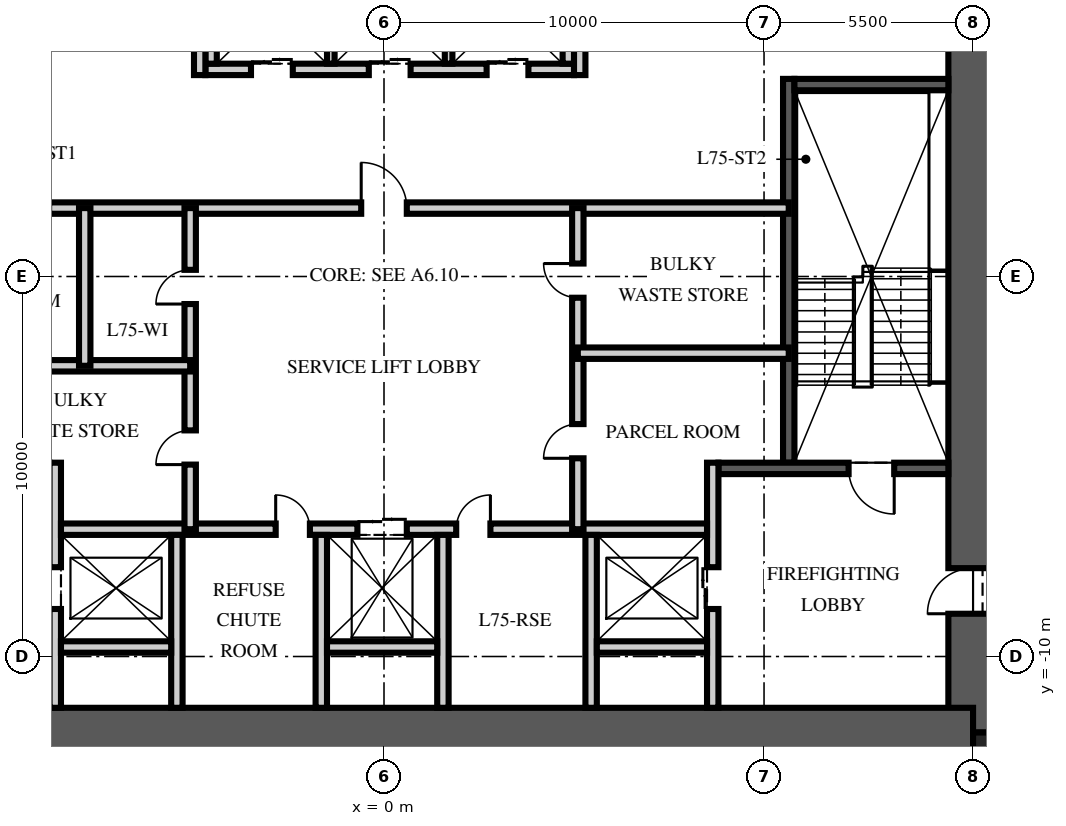
"""IFC4 building model, lengths in metres.
Left out: names, types, materials, properties, quantities, classifications, styles, units other than length and angle.
Written with IfcOpenShell. Run it as: python <this file> out.ifc"""

import sys

from ifc_helpers import new_model, si_unit, direction, frame, frame_2d, origin, origin_2d, place, context, subcontext, project, spatial, rectangle, extrude, element, fill, save


model = new_model("IFC4")
c1 = context("Model", 3, precision=1e-05, world=origin(), true_north=direction((0.0, 1.0)))
c2 = subcontext(c1, "Body", "Model", "MODEL_VIEW")
j1 = project(units=[si_unit("LENGTHUNIT", "METRE"), si_unit("PLANEANGLEUNIT", "RADIAN")], contexts=[c1])
p1 = place(None, origin())
s1 = spatial("IfcSite", under=j1, at=p1, CompositionType="ELEMENT")
p2 = place(p1, origin())
s2 = spatial("IfcBuilding", under=s1, at=p2, CompositionType="ELEMENT")
p3 = place(p2, frame((0.0, 0.0, 300.75)))
s3 = spatial("IfcBuildingStorey", under=s2, at=p3, CompositionType="ELEMENT", Elevation=300.75)
p4 = place(p3, frame((15.5, -12.0, -0.25), z_axis=(0.0, 0.0, 1.0), x_axis=(0.0, 1.0, 0.0)))
e1 = element("IfcWall", 1, at=p4, inside=s3, PredefinedType="SHEAR", context=c2, shape_type="SweptSolid", body=[
    extrude(rectangle(XDim=24.0, YDim=1.3, at=frame_2d((12.0, 0.0))), origin(), (0.0, 0.0, 1.0), 3.75),
])
p5 = place(p4, frame((3.125, 0.0, 0.25)))
e2 = element("IfcOpeningElement", 2, at=p5, cuts=e1, PredefinedType="OPENING", context=c2, shape_type="SweptSolid", body=[
    extrude(rectangle(XDim=1.2, YDim=2.1, at=frame_2d((0.6, 1.05))), frame((0.0, 0.66, 0.0), z_axis=(0.0, -1.0, 0.0), x_axis=(1.0, 0.0, 0.0)), (0.0, 0.0, 1.0), 1.32),
])
p6 = place(p4, frame((19.375, 0.0, 0.25)))
e3 = element("IfcOpeningElement", 3, at=p6, cuts=e1, PredefinedType="OPENING", context=c2, shape_type="SweptSolid", body=[
    extrude(rectangle(XDim=1.8, YDim=2.1, at=frame_2d((0.9, 1.05))), frame((0.0, 0.66, 0.0), z_axis=(0.0, -1.0, 0.0), x_axis=(1.0, 0.0, 0.0)), (0.0, 0.0, 1.0), 1.32),
])
p7 = place(p3, frame((-15.5, -12.0, -0.25), z_axis=(0.0, 0.0, 1.0), x_axis=(1.0, 0.0, 0.0)))
e4 = element("IfcWall", 4, at=p7, inside=s3, PredefinedType="SHEAR", context=c2, shape_type="SweptSolid", body=[
    extrude(rectangle(XDim=31.0, YDim=1.3, at=frame_2d((15.5, 0.0))), origin(), (0.0, 0.0, 1.0), 3.75),
])
p8 = place(p3, frame((15.825, -12.325, -0.25), z_axis=(0.0, 0.0, 1.0), x_axis=(1.0, 0.0, 0.0)))
e5 = element("IfcColumn", 5, at=p8, inside=s3, PredefinedType="COLUMN", context=c2, shape_type="SweptSolid", body=[
    extrude(rectangle(XDim=0.65, YDim=0.65, at=origin_2d()), origin(), (0.0, 0.0, 1.0), 3.75),
])
p9 = place(p3, frame((-8.65, -11.35, 0.0), z_axis=(0.0, 0.0, 1.0), x_axis=(0.0, 1.0, 0.0)))
e6 = element("IfcWall", 6, at=p9, inside=s3, PredefinedType="PARTITIONING", context=c2, shape_type="SweptSolid", body=[
    extrude(rectangle(XDim=6.45, YDim=0.3, at=frame_2d((3.225, 0.0))), origin(), (0.0, 0.0, 1.0), 3.5),
])
p10 = place(p9, frame((2.6, 0.0, 0.0)))
e7 = element("IfcOpeningElement", 7, at=p10, cuts=e6, PredefinedType="OPENING", context=c2, shape_type="SweptSolid", body=[
    extrude(rectangle(XDim=1.1, YDim=2.1, at=frame_2d((0.55, 1.05))), frame((0.0, 0.16, 0.0), z_axis=(0.0, -1.0, 0.0), x_axis=(1.0, 0.0, 0.0)), (0.0, 0.0, 1.0), 0.32),
])
p11 = place(p3, frame((10.65, -4.9, 0.0), z_axis=(0.0, 0.0, 1.0), x_axis=(0.0, 1.0, 0.0)))
e8 = element("IfcWall", 8, at=p11, inside=s3, PredefinedType="SOLIDWALL", context=c2, shape_type="SweptSolid", body=[
    extrude(rectangle(XDim=10.1, YDim=0.3, at=frame_2d((5.05, 0.0))), origin(), (0.0, 0.0, 1.0), 3.5),
])
p12 = place(p3, frame((14.85, -5.05, 0.0), z_axis=(0.0, 0.0, 1.0), x_axis=(-1.0, 0.0, 0.0)))
e9 = element("IfcWall", 9, at=p12, inside=s3, PredefinedType="SOLIDWALL", context=c2, shape_type="SweptSolid", body=[
    extrude(rectangle(XDim=6.05, YDim=0.3, at=frame_2d((3.025, 0.0))), origin(), (0.0, 0.0, 1.0), 3.5),
])
p13 = place(p12, frame((1.425, 0.0, 0.0)))
e10 = element("IfcOpeningElement", 10, at=p13, cuts=e9, PredefinedType="OPENING", context=c2, shape_type="SweptSolid", body=[
    extrude(rectangle(XDim=1.2, YDim=2.1, at=frame_2d((0.6, 1.05))), frame((0.0, 0.16, 0.0), z_axis=(0.0, -1.0, 0.0), x_axis=(1.0, 0.0, 0.0)), (0.0, 0.0, 1.0), 0.32),
])
p14 = place(p3, frame((14.85, 5.05, 0.0), z_axis=(0.0, 0.0, 1.0), x_axis=(-1.0, 0.0, 0.0)))
e11 = element("IfcWall", 11, at=p14, inside=s3, PredefinedType="SOLIDWALL", context=c2, shape_type="SweptSolid", body=[
    extrude(rectangle(XDim=4.05, YDim=0.3, at=frame_2d((2.025, 0.0))), origin(), (0.0, 0.0, 1.0), 3.5),
])
p15 = place(p3, frame((8.65, -11.35, 0.0), z_axis=(0.0, 0.0, 1.0), x_axis=(0.0, 1.0, 0.0)))
e12 = element("IfcWall", 12, at=p15, inside=s3, PredefinedType="PARTITIONING", context=c2, shape_type="SweptSolid", body=[
    extrude(rectangle(XDim=6.45, YDim=0.3, at=frame_2d((3.225, 0.0))), origin(), (0.0, 0.0, 1.0), 3.5),
])
p16 = place(p15, frame((2.6, 0.0, 0.0)))
e13 = element("IfcOpeningElement", 13, at=p16, cuts=e12, PredefinedType="OPENING", context=c2, shape_type="SweptSolid", body=[
    extrude(rectangle(XDim=1.1, YDim=2.1, at=frame_2d((0.55, 1.05))), frame((0.0, 0.16, 0.0), z_axis=(0.0, -1.0, 0.0), x_axis=(1.0, 0.0, 0.0)), (0.0, 0.0, 1.0), 0.32),
])
p17 = place(p3, frame((-8.5, -6.65, 0.0), z_axis=(0.0, 0.0, 1.0), x_axis=(1.0, 0.0, 0.0)))
e14 = element("IfcWall", 14, at=p17, inside=s3, PredefinedType="PARTITIONING", context=c2, shape_type="SweptSolid", body=[
    extrude(rectangle(XDim=17.0, YDim=0.3, at=frame_2d((8.5, 0.0))), origin(), (0.0, 0.0, 1.0), 3.5),
])
p18 = place(p17, frame((7.8, 0.0, 0.0)))
e15 = element("IfcOpeningElement", 15, at=p18, cuts=e14, PredefinedType="OPENING", context=c2, shape_type="SweptSolid", body=[
    extrude(rectangle(XDim=1.3, YDim=2.4, at=frame_2d((0.65, 1.2))), frame((0.0, 0.16, 0.0), z_axis=(0.0, -1.0, 0.0), x_axis=(1.0, 0.0, 0.0)), (0.0, 0.0, 1.0), 0.32),
])
p19 = place(p17, frame((5.65, 0.0, 0.0)))
e16 = element("IfcOpeningElement", 16, at=p19, cuts=e14, PredefinedType="OPENING", context=c2, shape_type="SweptSolid", body=[
    extrude(rectangle(XDim=0.9, YDim=2.1, at=frame_2d((0.45, 1.05))), frame((0.0, 0.16, 0.0), z_axis=(0.0, -1.0, 0.0), x_axis=(1.0, 0.0, 0.0)), (0.0, 0.0, 1.0), 0.32),
])
p20 = place(p17, frame((10.4, 0.0, 0.0)))
e17 = element("IfcOpeningElement", 17, at=p20, cuts=e14, PredefinedType="OPENING", context=c2, shape_type="SweptSolid", body=[
    extrude(rectangle(XDim=0.9, YDim=2.1, at=frame_2d((0.45, 1.05))), frame((0.0, 0.16, 0.0), z_axis=(0.0, -1.0, 0.0), x_axis=(1.0, 0.0, 0.0)), (0.0, 0.0, 1.0), 0.32),
])
for number, where, z_axis, x_axis in (
    (18, (-5.45, -11.35, 0.0), (0.0, 0.0, 1.0), (0.0, 1.0, 0.0)),
    (19, (-1.65, -11.35, 0.0), (0.0, 0.0, 1.0), (0.0, 1.0, 0.0)),
    (20, (1.55, -11.35, 0.0), (0.0, 0.0, 1.0), (0.0, 1.0, 0.0)),
    (21, (5.45, -11.35, 0.0), (0.0, 0.0, 1.0), (0.0, 1.0, 0.0)),
):
    element("IfcWall", number, at=place(p3, frame(where, z_axis=z_axis, x_axis=x_axis)), inside=s3, PredefinedType="PARTITIONING", context=c2, shape_type="SweptSolid", body=[
        extrude(rectangle(XDim=4.55, YDim=0.3, at=frame_2d((2.275, 0.0))), origin(), (0.0, 0.0, 1.0), 3.5),
    ])
for number, where, z_axis, x_axis in (
    (22, (-8.5, -9.75, 0.0), (0.0, 0.0, 1.0), (1.0, 0.0, 0.0)),
    (23, (-1.5, -9.75, 0.0), (0.0, 0.0, 1.0), (1.0, 0.0, 0.0)),
    (24, (5.6, -9.75, 0.0), (0.0, 0.0, 1.0), (1.0, 0.0, 0.0)),
):
    element("IfcWall", number, at=place(p3, frame(where, z_axis=z_axis, x_axis=x_axis)), inside=s3, PredefinedType="PARTITIONING", context=c2, shape_type="SweptSolid", body=[
        extrude(rectangle(XDim=2.9, YDim=0.3, at=frame_2d((1.45, 0.0))), origin(), (0.0, 0.0, 1.0), 3.5),
    ])
p21 = place(p3, frame((-4.7, 5.45, 0.0), z_axis=(0.0, 0.0, 1.0), x_axis=(1.0, 0.0, 0.0)))
e25 = element("IfcWall", 25, at=p21, inside=s3, PredefinedType="PARTITIONING", context=c2, shape_type="SweptSolid", body=[
    extrude(rectangle(XDim=9.7, YDim=0.3, at=frame_2d((4.85, 0.0))), origin(), (0.0, 0.0, 1.0), 3.5),
])
p22 = place(p21, frame((1.2, 0.0, 0.0)))
e26 = element("IfcOpeningElement", 26, at=p22, cuts=e25, PredefinedType="OPENING", context=c2, shape_type="SweptSolid", body=[
    extrude(rectangle(XDim=1.1, YDim=2.1, at=frame_2d((0.55, 1.05))), frame((0.0, 0.16, 0.0), z_axis=(0.0, -1.0, 0.0), x_axis=(1.0, 0.0, 0.0)), (0.0, 0.0, 1.0), 0.32),
])
p23 = place(p21, frame((4.3, 0.0, 0.0)))
e27 = element("IfcOpeningElement", 27, at=p23, cuts=e25, PredefinedType="OPENING", context=c2, shape_type="SweptSolid", body=[
    extrude(rectangle(XDim=1.1, YDim=2.1, at=frame_2d((0.55, 1.05))), frame((0.0, 0.16, 0.0), z_axis=(0.0, -1.0, 0.0), x_axis=(1.0, 0.0, 0.0)), (0.0, 0.0, 1.0), 0.32),
])
p24 = place(p21, frame((7.4, 0.0, 0.0)))
e28 = element("IfcOpeningElement", 28, at=p24, cuts=e25, PredefinedType="OPENING", context=c2, shape_type="SweptSolid", body=[
    extrude(rectangle(XDim=1.1, YDim=2.1, at=frame_2d((0.55, 1.05))), frame((0.0, 0.16, 0.0), z_axis=(0.0, -1.0, 0.0), x_axis=(1.0, 0.0, 0.0)), (0.0, 0.0, 1.0), 0.32),
])
for number, where, z_axis, x_axis in (
    (29, (-4.55, 5.6, 0.0), (0.0, 0.0, 1.0), (0.0, 1.0, 0.0)),
    (30, (4.85, 5.6, 0.0), (0.0, 0.0, 1.0), (0.0, 1.0, 0.0)),
):
    element("IfcWall", number, at=place(p3, frame(where, z_axis=z_axis, x_axis=x_axis)), inside=s3, PredefinedType="PARTITIONING", context=c2, shape_type="SweptSolid", body=[
        extrude(rectangle(XDim=2.8, YDim=0.3, at=frame_2d((1.4, 0.0))), origin(), (0.0, 0.0, 1.0), 3.5),
    ])
for number, where, z_axis, x_axis in (
    (31, (-1.4, 5.6, 0.0), (0.0, 0.0, 1.0), (0.0, 1.0, 0.0)),
    (32, (1.7, 5.6, 0.0), (0.0, 0.0, 1.0), (0.0, 1.0, 0.0)),
):
    element("IfcWall", number, at=place(p3, frame(where, z_axis=z_axis, x_axis=x_axis)), inside=s3, PredefinedType="PARTITIONING", context=c2, shape_type="SweptSolid", body=[
        extrude(rectangle(XDim=2.8, YDim=0.2, at=frame_2d((1.4, 0.0))), origin(), (0.0, 0.0, 1.0), 3.5),
    ])
p25 = place(p3, frame((-10.65, 1.8, 0.0), z_axis=(0.0, 0.0, 1.0), x_axis=(1.0, 0.0, 0.0)))
e33 = element("IfcWall", 33, at=p25, inside=s3, PredefinedType="PARTITIONING", context=c2, shape_type="SweptSolid", body=[
    extrude(rectangle(XDim=21.3, YDim=0.3, at=frame_2d((10.65, 0.0))), origin(), (0.0, 0.0, 1.0), 3.5),
])
p26 = place(p25, frame((10.05, 0.0, 0.0)))
e34 = element("IfcOpeningElement", 34, at=p26, cuts=e33, PredefinedType="OPENING", context=c2, shape_type="SweptSolid", body=[
    extrude(rectangle(XDim=1.2, YDim=2.1, at=frame_2d((0.6, 1.05))), frame((0.0, 0.16, 0.0), z_axis=(0.0, -1.0, 0.0), x_axis=(1.0, 0.0, 0.0)), (0.0, 0.0, 1.0), 0.32),
])
p27 = place(p25, frame((0.938, 0.0, 0.0)))
e35 = element("IfcOpeningElement", 35, at=p27, cuts=e33, PredefinedType="OPENING", context=c2, shape_type="SweptSolid", body=[
    extrude(rectangle(XDim=0.9, YDim=2.1, at=frame_2d((0.45, 1.05))), frame((0.0, 0.16, 0.0), z_axis=(0.0, -1.0, 0.0), x_axis=(1.0, 0.0, 0.0)), (0.0, 0.0, 1.0), 0.32),
])
p28 = place(p3, frame((-5.1, -6.65, 0.0), z_axis=(0.0, 0.0, 1.0), x_axis=(0.0, 1.0, 0.0)))
e36 = element("IfcWall", 36, at=p28, inside=s3, PredefinedType="PARTITIONING", context=c2, shape_type="SweptSolid", body=[
    extrude(rectangle(XDim=8.45, YDim=0.3, at=frame_2d((4.225, 0.0))), origin(), (0.0, 0.0, 1.0), 3.5),
])
p29 = place(p28, frame((1.7, 0.0, 0.0)))
e37 = element("IfcOpeningElement", 37, at=p29, cuts=e36, PredefinedType="OPENING", context=c2, shape_type="SweptSolid", body=[
    extrude(rectangle(XDim=0.9, YDim=2.1, at=frame_2d((0.45, 1.05))), frame((0.0, 0.16, 0.0), z_axis=(0.0, -1.0, 0.0), x_axis=(1.0, 0.0, 0.0)), (0.0, 0.0, 1.0), 0.32),
])
p30 = place(p28, frame((5.925, 0.0, 0.0)))
e38 = element("IfcOpeningElement", 38, at=p30, cuts=e36, PredefinedType="OPENING", context=c2, shape_type="SweptSolid", body=[
    extrude(rectangle(XDim=0.9, YDim=2.1, at=frame_2d((0.45, 1.05))), frame((0.0, 0.16, 0.0), z_axis=(0.0, -1.0, 0.0), x_axis=(1.0, 0.0, 0.0)), (0.0, 0.0, 1.0), 0.32),
])
p31 = place(p3, frame((5.1, -6.65, 0.0), z_axis=(0.0, 0.0, 1.0), x_axis=(0.0, 1.0, 0.0)))
e39 = element("IfcWall", 39, at=p31, inside=s3, PredefinedType="PARTITIONING", context=c2, shape_type="SweptSolid", body=[
    extrude(rectangle(XDim=8.45, YDim=0.3, at=frame_2d((4.225, 0.0))), origin(), (0.0, 0.0, 1.0), 3.5),
])
p32 = place(p31, frame((1.866, 0.0, 0.0)))
e40 = element("IfcOpeningElement", 40, at=p32, cuts=e39, PredefinedType="OPENING", context=c2, shape_type="SweptSolid", body=[
    extrude(rectangle(XDim=0.9, YDim=2.1, at=frame_2d((0.45, 1.05))), frame((0.0, 0.16, 0.0), z_axis=(0.0, -1.0, 0.0), x_axis=(1.0, 0.0, 0.0)), (0.0, 0.0, 1.0), 0.32),
])
p33 = place(p31, frame((6.091, 0.0, 0.0)))
e41 = element("IfcOpeningElement", 41, at=p33, cuts=e39, PredefinedType="OPENING", context=c2, shape_type="SweptSolid", body=[
    extrude(rectangle(XDim=0.9, YDim=2.1, at=frame_2d((0.45, 1.05))), frame((0.0, 0.16, 0.0), z_axis=(0.0, -1.0, 0.0), x_axis=(1.0, 0.0, 0.0)), (0.0, 0.0, 1.0), 0.32),
])
p34 = place(p3, frame((-10.65, -2.35, 0.0), z_axis=(0.0, 0.0, 1.0), x_axis=(1.0, 0.0, 0.0)))
e42 = element("IfcWall", 42, at=p34, inside=s3, PredefinedType="PARTITIONING", context=c2, shape_type="SweptSolid", body=[
    extrude(rectangle(XDim=5.55, YDim=0.3, at=frame_2d((2.775, 0.0))), origin(), (0.0, 0.0, 1.0), 3.5),
])
p35 = place(p3, frame((-7.875, -2.35, 0.0), z_axis=(0.0, 0.0, 1.0), x_axis=(0.0, 1.0, 0.0)))
e43 = element("IfcWall", 43, at=p35, inside=s3, PredefinedType="PARTITIONING", context=c2, shape_type="SweptSolid", body=[
    extrude(rectangle(XDim=4.15, YDim=0.3, at=frame_2d((2.075, 0.0))), origin(), (0.0, 0.0, 1.0), 3.5),
])
p36 = place(p3, frame((10.65, -2.018, 0.0), z_axis=(0.0, 0.0, 1.0), x_axis=(-1.0, 0.0, 0.0)))
e44 = element("IfcWall", 44, at=p36, inside=s3, PredefinedType="PARTITIONING", context=c2, shape_type="SweptSolid", body=[
    extrude(rectangle(XDim=5.55, YDim=0.3, at=frame_2d((2.775, 0.0))), origin(), (0.0, 0.0, 1.0), 3.5),
])
p37 = place(p3, frame((-4.85, 5.3, 0.0), z_axis=(0.0, 0.0, 1.0), x_axis=(0.0, 1.0, 0.0)))
e45 = element("IfcWall", 45, at=p37, inside=s3, PredefinedType="PARTITIONING", context=c2, shape_type="SweptSolid", body=[
    extrude(rectangle(XDim=6.05, YDim=0.3, at=frame_2d((3.025, 0.0))), origin(), (0.0, 0.0, 1.0), 3.5),
])
p38 = place(p3, frame((5.15, 5.3, 0.0), z_axis=(0.0, 0.0, 1.0), x_axis=(0.0, 1.0, 0.0)))
e46 = element("IfcWall", 46, at=p38, inside=s3, PredefinedType="PARTITIONING", context=c2, shape_type="SweptSolid", body=[
    extrude(rectangle(XDim=6.05, YDim=0.3, at=frame_2d((3.025, 0.0))), origin(), (0.0, 0.0, 1.0), 3.5),
])
p39 = place(p38, frame((4.225, 0.0, 0.0)))
e47 = element("IfcOpeningElement", 47, at=p39, cuts=e46, PredefinedType="OPENING", context=c2, shape_type="SweptSolid", body=[
    extrude(rectangle(XDim=0.9, YDim=2.1, at=frame_2d((0.45, 1.05))), frame((0.0, 0.16, 0.0), z_axis=(0.0, -1.0, 0.0), x_axis=(1.0, 0.0, 0.0)), (0.0, 0.0, 1.0), 0.32),
])
p40 = place(p13, origin())
e48 = element("IfcDoor", 48, at=p40, inside=s3, OperationType="SINGLE_SWING_LEFT", PredefinedType="DOOR", context=c2, shape_type="SweptSolid", body=[
    extrude(rectangle(XDim=1.2, YDim=2.1, at=frame_2d((0.6, 1.05))), frame((0.0, 0.025, 0.0), z_axis=(0.0, -1.0, 0.0), x_axis=(1.0, 0.0, 0.0)), (0.0, 0.0, 1.0), 0.05),
])
fill(e10, e48)
p41 = place(p5, origin())
e49 = element("IfcDoor", 49, at=p41, inside=s3, OperationType="SINGLE_SWING_LEFT", PredefinedType="DOOR", context=c2, shape_type="SweptSolid", body=[
    extrude(rectangle(XDim=1.2, YDim=2.1, at=frame_2d((0.6, 1.05))), frame((0.0, 0.025, 0.0), z_axis=(0.0, -1.0, 0.0), x_axis=(1.0, 0.0, 0.0)), (0.0, 0.0, 1.0), 0.05),
])
fill(e2, e49)
p42 = place(p10, origin())
e50 = element("IfcDoor", 50, at=p42, inside=s3, OperationType="DOUBLE_DOOR_SLIDING", PredefinedType="DOOR", context=c2, shape_type="SweptSolid", body=[
    extrude(rectangle(XDim=1.1, YDim=2.1, at=frame_2d((0.55, 1.05))), frame((0.0, 0.025, 0.0), z_axis=(0.0, -1.0, 0.0), x_axis=(1.0, 0.0, 0.0)), (0.0, 0.0, 1.0), 0.05),
])
fill(e7, e50)
p43 = place(p16, origin())
e51 = element("IfcDoor", 51, at=p43, inside=s3, OperationType="DOUBLE_DOOR_SLIDING", PredefinedType="DOOR", context=c2, shape_type="SweptSolid", body=[
    extrude(rectangle(XDim=1.1, YDim=2.1, at=frame_2d((0.55, 1.05))), frame((0.0, 0.025, 0.0), z_axis=(0.0, -1.0, 0.0), x_axis=(1.0, 0.0, 0.0)), (0.0, 0.0, 1.0), 0.05),
])
fill(e13, e51)
p44 = place(p22, origin())
e52 = element("IfcDoor", 52, at=p44, inside=s3, OperationType="DOUBLE_DOOR_SLIDING", PredefinedType="DOOR", context=c2, shape_type="SweptSolid", body=[
    extrude(rectangle(XDim=1.1, YDim=2.1, at=frame_2d((0.55, 1.05))), frame((0.0, 0.025, 0.0), z_axis=(0.0, -1.0, 0.0), x_axis=(1.0, 0.0, 0.0)), (0.0, 0.0, 1.0), 0.05),
])
fill(e26, e52)
p45 = place(p23, origin())
e53 = element("IfcDoor", 53, at=p45, inside=s3, OperationType="DOUBLE_DOOR_SLIDING", PredefinedType="DOOR", context=c2, shape_type="SweptSolid", body=[
    extrude(rectangle(XDim=1.1, YDim=2.1, at=frame_2d((0.55, 1.05))), frame((0.0, 0.025, 0.0), z_axis=(0.0, -1.0, 0.0), x_axis=(1.0, 0.0, 0.0)), (0.0, 0.0, 1.0), 0.05),
])
fill(e27, e53)
p46 = place(p24, origin())
e54 = element("IfcDoor", 54, at=p46, inside=s3, OperationType="DOUBLE_DOOR_SLIDING", PredefinedType="DOOR", context=c2, shape_type="SweptSolid", body=[
    extrude(rectangle(XDim=1.1, YDim=2.1, at=frame_2d((0.55, 1.05))), frame((0.0, 0.025, 0.0), z_axis=(0.0, -1.0, 0.0), x_axis=(1.0, 0.0, 0.0)), (0.0, 0.0, 1.0), 0.05),
])
fill(e28, e54)
p47 = place(p18, origin())
e55 = element("IfcDoor", 55, at=p47, inside=s3, OperationType="DOUBLE_DOOR_SLIDING", PredefinedType="DOOR", context=c2, shape_type="SweptSolid", body=[
    extrude(rectangle(XDim=1.3, YDim=2.4, at=frame_2d((0.65, 1.2))), frame((0.0, 0.025, 0.0), z_axis=(0.0, -1.0, 0.0), x_axis=(1.0, 0.0, 0.0)), (0.0, 0.0, 1.0), 0.05),
])
fill(e15, e55)
p48 = place(p26, origin())
e56 = element("IfcDoor", 56, at=p48, inside=s3, OperationType="SINGLE_SWING_LEFT", PredefinedType="DOOR", context=c2, shape_type="SweptSolid", body=[
    extrude(rectangle(XDim=1.2, YDim=2.1, at=frame_2d((0.6, 1.05))), frame((0.0, 0.025, 0.0), z_axis=(0.0, -1.0, 0.0), x_axis=(1.0, 0.0, 0.0)), (0.0, 0.0, 1.0), 0.05),
])
fill(e34, e56)
p49 = place(p19, origin())
e57 = element("IfcDoor", 57, at=p49, inside=s3, OperationType="SINGLE_SWING_LEFT", PredefinedType="DOOR", context=c2, shape_type="SweptSolid", body=[
    extrude(rectangle(XDim=0.9, YDim=2.1, at=frame_2d((0.45, 1.05))), frame((0.0, 0.025, 0.0), z_axis=(0.0, -1.0, 0.0), x_axis=(1.0, 0.0, 0.0)), (0.0, 0.0, 1.0), 0.05),
])
fill(e16, e57)
p50 = place(p20, origin())
e58 = element("IfcDoor", 58, at=p50, inside=s3, OperationType="SINGLE_SWING_RIGHT", PredefinedType="DOOR", context=c2, shape_type="SweptSolid", body=[
    extrude(rectangle(XDim=0.9, YDim=2.1, at=frame_2d((0.45, 1.05))), frame((0.0, 0.025, 0.0), z_axis=(0.0, -1.0, 0.0), x_axis=(1.0, 0.0, 0.0)), (0.0, 0.0, 1.0), 0.05),
])
fill(e17, e58)
p51 = place(p29, origin())
e59 = element("IfcDoor", 59, at=p51, inside=s3, OperationType="SINGLE_SWING_LEFT", PredefinedType="DOOR", context=c2, shape_type="SweptSolid", body=[
    extrude(rectangle(XDim=0.9, YDim=2.1, at=frame_2d((0.45, 1.05))), frame((0.0, 0.025, 0.0), z_axis=(0.0, -1.0, 0.0), x_axis=(1.0, 0.0, 0.0)), (0.0, 0.0, 1.0), 0.05),
])
fill(e37, e59)
p52 = place(p30, origin())
e60 = element("IfcDoor", 60, at=p52, inside=s3, OperationType="SINGLE_SWING_LEFT", PredefinedType="DOOR", context=c2, shape_type="SweptSolid", body=[
    extrude(rectangle(XDim=0.9, YDim=2.1, at=frame_2d((0.45, 1.05))), frame((0.0, 0.025, 0.0), z_axis=(0.0, -1.0, 0.0), x_axis=(1.0, 0.0, 0.0)), (0.0, 0.0, 1.0), 0.05),
])
fill(e38, e60)
p53 = place(p32, origin())
e61 = element("IfcDoor", 61, at=p53, inside=s3, OperationType="SINGLE_SWING_LEFT", PredefinedType="DOOR", context=c2, shape_type="SweptSolid", body=[
    extrude(rectangle(XDim=0.9, YDim=2.1, at=frame_2d((0.45, 1.05))), frame((0.0, 0.025, 0.0), z_axis=(0.0, -1.0, 0.0), x_axis=(1.0, 0.0, 0.0)), (0.0, 0.0, 1.0), 0.05),
])
fill(e40, e61)
p54 = place(p33, origin())
e62 = element("IfcDoor", 62, at=p54, inside=s3, OperationType="SINGLE_SWING_RIGHT", PredefinedType="DOOR", context=c2, shape_type="SweptSolid", body=[
    extrude(rectangle(XDim=0.9, YDim=2.1, at=frame_2d((0.45, 1.05))), frame((0.0, 0.025, 0.0), z_axis=(0.0, -1.0, 0.0), x_axis=(1.0, 0.0, 0.0)), (0.0, 0.0, 1.0), 0.05),
])
fill(e41, e62)
save(model, sys.argv[1])
